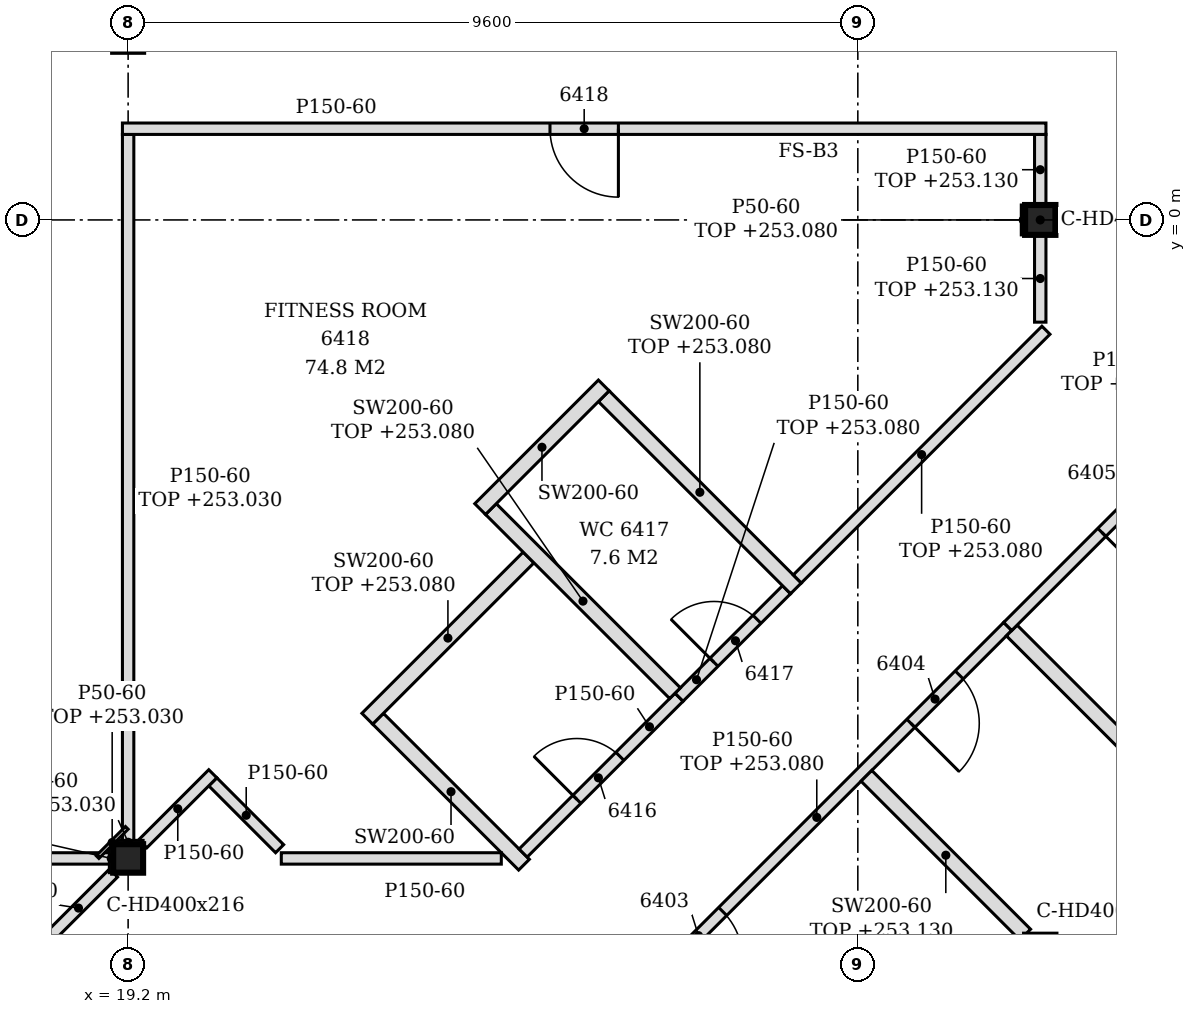
"""IFC4 building model, lengths in metres.
Left out: names, types, materials, properties, quantities, classifications, styles, units other than length and angle.
Written with IfcOpenShell. Run it as: python <this file> out.ifc"""

import sys

from ifc_helpers import new_model, si_unit, direction, frame, frame_2d, origin, origin_2d, place, context, subcontext, project, spatial, polyline, rectangle, i_section, outline, extrude, element, fill, save


model = new_model("IFC4")
c1 = context("Model", 3, precision=1e-05, world=origin(), true_north=direction((0.0, 1.0)))
c2 = subcontext(c1, "Body", "Model", "MODEL_VIEW")
j1 = project(units=[si_unit("LENGTHUNIT", "METRE"), si_unit("PLANEANGLEUNIT", "RADIAN")], contexts=[c1])
p1 = place(None, origin())
s1 = spatial("IfcSite", under=j1, at=p1, CompositionType="ELEMENT")
p2 = place(p1, origin())
s2 = spatial("IfcBuilding", under=s1, at=p2, CompositionType="ELEMENT")
p3 = place(p2, frame((0.0, 0.0, 250.2)))
s3 = spatial("IfcBuildingStorey", under=s2, at=p3, CompositionType="ELEMENT", Elevation=250.2)
p4 = place(p3, frame((19.2, -8.4, -0.15), z_axis=(0.0, 0.0, 1.0), x_axis=(1.0, 0.0, 0.0)))
e1 = element("IfcColumn", 1, at=p4, inside=s3, PredefinedType="COLUMN", context=c2, shape_type="SweptSolid", body=[
    extrude(i_section(OverallWidth=0.394, OverallDepth=0.375, WebThickness=0.017, FlangeThickness=0.028, FilletRadius=0.015, at=origin_2d()), origin(), (0.0, 0.0, 1.0), 3.6),
])
p5 = place(p3, frame((31.2, 0.0, -0.15), z_axis=(0.0, 0.0, 1.0), x_axis=(1.0, 0.0, 0.0)))
e2 = element("IfcColumn", 2, at=p5, inside=s3, PredefinedType="COLUMN", context=c2, shape_type="SweptSolid", body=[
    extrude(i_section(OverallWidth=0.399, OverallDepth=0.393, WebThickness=0.023, FlangeThickness=0.037, FilletRadius=0.015, at=origin_2d()), origin(), (0.0, 0.0, 1.0), 3.6),
])
p6 = place(p3, frame((24.619, -11.501, 0.0), z_axis=(0.0, 0.0, 1.0), x_axis=(0.707106781187, 0.707106781187, 0.0)))
e3 = element("IfcWall", 3, at=p6, inside=s3, PredefinedType="PARTITIONING", context=c2, shape_type="SweptSolid", body=[
    extrude(rectangle(XDim=8.702, YDim=0.15, at=frame_2d((4.351, 0.0))), origin(), (0.0, 0.0, 1.0), 2.88),
])
p7 = place(p6, frame((2.499, 0.0, 0.0)))
e4 = element("IfcOpeningElement", 4, at=p7, cuts=e3, PredefinedType="OPENING", context=c2, shape_type="SweptSolid", body=[
    extrude(rectangle(XDim=0.9, YDim=2.1, at=frame_2d((0.45, 1.05))), frame((0.0, 0.085, 0.0), z_axis=(0.0, -1.0, 0.0), x_axis=(1.0, 0.0, 0.0)), (0.0, 0.0, 1.0), 0.17),
])
p8 = place(p6, frame((6.9, 0.0, 0.0)))
e5 = element("IfcOpeningElement", 5, at=p8, cuts=e3, PredefinedType="OPENING", context=c2, shape_type="SweptSolid", body=[
    extrude(rectangle(XDim=0.9, YDim=2.1, at=frame_2d((0.45, 1.05))), frame((0.0, 0.085, 0.0), z_axis=(0.0, -1.0, 0.0), x_axis=(1.0, 0.0, 0.0)), (0.0, 0.0, 1.0), 0.17),
])
p9 = place(p3, frame((35.873, -10.449, 0.0), z_axis=(0.0, 0.0, 1.0), x_axis=(-0.707089680867, 0.707123881093, 0.0)))
e6 = element("IfcWall", 6, at=p9, inside=s3, PredefinedType="PARTITIONING", context=c2, shape_type="SweptSolid", body=[
    extrude(rectangle(XDim=7.139, YDim=0.2, at=frame_2d((3.569, 0.0))), origin(), (0.0, 0.0, 1.0), 2.93),
])
p10 = place(p3, frame((18.086, -9.514, 0.0), z_axis=(0.0, 0.0, 1.0), x_axis=(0.707200419109, 0.707013130862, 0.0)))
e7 = element("IfcWall", 7, at=p10, inside=s3, PredefinedType="PARTITIONING", context=c2, shape_type="SweptSolid", body=[
    extrude(rectangle(XDim=1.303, YDim=0.15, at=frame_2d((0.652, 0.0))), origin(), (0.0, 0.0, 1.0), 3.45),
])
p11 = place(p3, frame((31.002, -9.402, 0.0), z_axis=(0.0, 0.0, 1.0), x_axis=(-0.707065460118, 0.70714809984, 0.0)))
e8 = element("IfcWall", 8, at=p11, inside=s3, PredefinedType="PARTITIONING", context=c2, shape_type="SweptSolid", body=[
    extrude(rectangle(XDim=2.954, YDim=0.2, at=frame_2d((1.477, 0.0))), origin(), (0.0, 0.0, 1.0), 2.93),
])
p12 = place(p3, frame((24.408, -8.482, 0.0), z_axis=(0.0, 0.0, 1.0), x_axis=(-0.707061835578, 0.707151723938, 0.0)))
e9 = element("IfcWall", 9, at=p12, inside=s3, PredefinedType="PARTITIONING", context=c2, shape_type="SweptSolid", body=[
    extrude(rectangle(XDim=2.716, YDim=0.2, at=frame_2d((1.358, 0.0))), origin(), (0.0, 0.0, 1.0), 3.45),
])
p13 = place(p3, frame((7.397, -8.4, 0.0), z_axis=(0.0, 0.0, 1.0), x_axis=(1.0, 0.0, 0.0)))
e10 = element("IfcWall", 10, at=p13, inside=s3, PredefinedType="PARTITIONING", context=c2, shape_type="SweptSolid", body=[
    extrude(rectangle(XDim=11.606, YDim=0.15, at=frame_2d((5.803, 0.0))), origin(), (0.0, 0.0, 1.0), 2.83),
])
p14 = place(p3, frame((21.215, -8.4, 0.0), z_axis=(0.0, 0.0, 1.0), x_axis=(1.0, 0.0, 0.0)))
e11 = element("IfcWall", 11, at=p14, inside=s3, PredefinedType="PARTITIONING", context=c2, shape_type="SweptSolid", body=[
    extrude(rectangle(XDim=2.895, YDim=0.15, at=frame_2d((1.447, 0.0))), origin(), (0.0, 0.0, 1.0), 3.45),
])
p15 = place(p3, frame((21.193, -8.272, 0.0), z_axis=(0.0, 0.0, 1.0), x_axis=(-0.706812296552, 0.70740114323, 0.0)))
e12 = element("IfcWall", 12, at=p15, inside=s3, PredefinedType="PARTITIONING", context=c2, shape_type="SweptSolid", body=[
    extrude(rectangle(XDim=1.244, YDim=0.15, at=frame_2d((0.622, 0.0))), origin(), (0.0, 0.0, 1.0), 3.45),
])
p16 = place(p3, frame((24.397, -8.329, 0.0), z_axis=(0.0, 0.0, 1.0), x_axis=(0.707275119896, 0.706938402391, 0.0)))
e13 = element("IfcWall", 13, at=p16, inside=s3, PredefinedType="PARTITIONING", context=c2, shape_type="SweptSolid", body=[
    extrude(rectangle(XDim=2.9, YDim=0.15, at=frame_2d((1.45, 0.0))), origin(), (0.0, 0.0, 1.0), 3.45),
])
p17 = place(p16, frame((1.0, 0.0, 0.0)))
e14 = element("IfcOpeningElement", 14, at=p17, cuts=e13, PredefinedType="OPENING", context=c2, shape_type="SweptSolid", body=[
    extrude(rectangle(XDim=0.8, YDim=2.1, at=frame_2d((0.4, 1.05))), frame((0.0, 0.085, 0.0), z_axis=(0.0, -1.0, 0.0), x_axis=(1.0, 0.0, 0.0)), (0.0, 0.0, 1.0), 0.17),
])
p18 = place(p3, frame((19.2, -8.212, 0.0), z_axis=(0.0, 0.0, 1.0), x_axis=(0.0, 1.0, 0.0)))
e15 = element("IfcWall", 15, at=p18, inside=s3, PredefinedType="PARTITIONING", context=c2, shape_type="SweptSolid", body=[
    extrude(rectangle(XDim=9.337, YDim=0.15, at=frame_2d((4.669, 0.0))), origin(), (0.0, 0.0, 1.0), 2.83),
])
p19 = place(p3, frame((19.392, -8.208, 0.0), z_axis=(0.0, 0.0, 1.0), x_axis=(0.707106781187, 0.707106781187, 0.0)))
e16 = element("IfcWall", 16, at=p19, inside=s3, PredefinedType="PARTITIONING", context=c2, shape_type="SweptSolid", body=[
    extrude(rectangle(XDim=1.304, YDim=0.15, at=frame_2d((0.652, 0.0))), origin(), (0.0, 0.0, 1.0), 3.45),
])
p20 = place(p3, frame((22.346, -6.562, 0.0), z_axis=(0.0, 0.0, 1.0), x_axis=(0.707269502796, 0.706944022123, 0.0)))
e17 = element("IfcWall", 17, at=p20, inside=s3, PredefinedType="PARTITIONING", context=c2, shape_type="SweptSolid", body=[
    extrude(rectangle(XDim=3.0, YDim=0.2, at=frame_2d((1.5, 0.0))), origin(), (0.0, 0.0, 1.0), 2.88),
])
p21 = place(p3, frame((26.448, -6.279, 0.0), z_axis=(0.0, 0.0, 1.0), x_axis=(0.707106781187, 0.707106781187, 0.0)))
e18 = element("IfcWall", 18, at=p21, inside=s3, PredefinedType="PARTITIONING", context=c2, shape_type="SweptSolid", body=[
    extrude(rectangle(XDim=2.0, YDim=0.15, at=frame_2d((1.0, 0.0))), origin(), (0.0, 0.0, 1.0), 2.88),
])
p22 = place(p21, frame((0.65, 0.0, 0.0)))
e19 = element("IfcOpeningElement", 19, at=p22, cuts=e18, PredefinedType="OPENING", context=c2, shape_type="SweptSolid", body=[
    extrude(rectangle(XDim=0.8, YDim=2.1, at=frame_2d((0.4, 1.05))), frame((0.0, 0.085, 0.0), z_axis=(0.0, -1.0, 0.0), x_axis=(1.0, 0.0, 0.0)), (0.0, 0.0, 1.0), 0.17),
])
p23 = place(p3, frame((26.395, -6.226, 0.0), z_axis=(0.0, 0.0, 1.0), x_axis=(-0.707106781187, 0.707106781187, 0.0)))
e20 = element("IfcWall", 20, at=p23, inside=s3, PredefinedType="PARTITIONING", context=c2, shape_type="SweptSolid", body=[
    extrude(rectangle(XDim=3.426, YDim=0.2, at=frame_2d((1.713, 0.0))), origin(), (0.0, 0.0, 1.0), 2.88),
])
p24 = place(p3, frame((30.772, -5.348, 0.0), z_axis=(0.0, 0.0, 1.0), x_axis=(0.70724543229, 0.706968102891, 0.0)))
e21 = element("IfcWall", 21, at=p24, inside=s3, PredefinedType="PARTITIONING", context=c2, shape_type="SweptSolid", body=[
    extrude(rectangle(XDim=4.402, YDim=0.15, at=frame_2d((2.201, 0.0))), origin(), (0.0, 0.0, 1.0), 2.93),
])
p25 = place(p24, frame((1.751, 0.0, 0.0)))
e22 = element("IfcOpeningElement", 22, at=p25, cuts=e21, PredefinedType="OPENING", context=c2, shape_type="SweptSolid", body=[
    extrude(rectangle(XDim=0.9, YDim=2.1, at=frame_2d((0.45, 1.05))), frame((0.0, 0.085, 0.0), z_axis=(0.0, -1.0, 0.0), x_axis=(1.0, 0.0, 0.0)), (0.0, 0.0, 1.0), 0.17),
])
p26 = place(p3, frame((27.986, -4.847, 0.0), z_axis=(0.0, 0.0, 1.0), x_axis=(-0.707106781187, 0.707106781187, 0.0)))
e23 = element("IfcWall", 23, at=p26, inside=s3, PredefinedType="PARTITIONING", context=c2, shape_type="SweptSolid", body=[
    extrude(rectangle(XDim=3.576, YDim=0.2, at=frame_2d((1.788, 0.0))), origin(), (0.0, 0.0, 1.0), 2.88),
])
p27 = place(p3, frame((28.004, -4.723, 0.0), z_axis=(0.0, 0.0, 1.0), x_axis=(0.706974860744, 0.707238677022, 0.0)))
e24 = element("IfcWall", 24, at=p27, inside=s3, PredefinedType="PARTITIONING", context=c2, shape_type="SweptSolid", body=[
    extrude(rectangle(XDim=4.627, YDim=0.15, at=frame_2d((2.313, 0.0))), origin(), (0.0, 0.0, 1.0), 2.88),
])
p28 = place(p3, frame((23.831, -3.804, 0.0), z_axis=(0.0, 0.0, 1.0), x_axis=(0.707106781187, 0.707106781187, 0.0)))
e25 = element("IfcWall", 25, at=p28, inside=s3, PredefinedType="PARTITIONING", context=c2, shape_type="SweptSolid", body=[
    extrude(rectangle(XDim=2.3, YDim=0.2, at=frame_2d((1.15, 0.0))), origin(), (0.0, 0.0, 1.0), 3.45),
])
p29 = place(p3, frame((31.2, -1.345, 0.0), z_axis=(0.0, 0.0, 1.0), x_axis=(0.0, 1.0, 0.0)))
e26 = element("IfcWall", 26, at=p29, inside=s3, PredefinedType="PARTITIONING", context=c2, shape_type="SweptSolid", body=[
    extrude(rectangle(XDim=1.148, YDim=0.15, at=frame_2d((0.574, 0.0))), origin(), (0.0, 0.0, 1.0), 2.93),
])
p30 = place(p3, frame((31.2, 0.197, 0.0), z_axis=(0.0, 0.0, 1.0), x_axis=(0.0, 1.0, 0.0)))
e27 = element("IfcWall", 27, at=p30, inside=s3, PredefinedType="PARTITIONING", context=c2, shape_type="SweptSolid", body=[
    extrude(rectangle(XDim=0.928, YDim=0.15, at=frame_2d((0.464, 0.0))), origin(), (0.0, 0.0, 1.0), 2.93),
])
p31 = place(p3, frame((34.8, 0.994, 0.0), z_axis=(0.0, 0.0, 1.0), x_axis=(-0.707099634543, 0.707113927758, 0.0)))
e28 = element("IfcWall", 28, at=p31, inside=s3, PredefinedType="PARTITIONING", context=c2, shape_type="SweptSolid", body=[
    extrude(rectangle(XDim=17.081, YDim=0.15, at=frame_2d((8.541, 0.0))), origin(), (0.0, 0.0, 1.0), 2.88),
])
p32 = place(p31, frame((3.276, 0.0, 0.0)))
e29 = element("IfcOpeningElement", 29, at=p32, cuts=e28, PredefinedType="OPENING", context=c2, shape_type="SweptSolid", body=[
    extrude(rectangle(XDim=0.9, YDim=2.1, at=frame_2d((0.45, 1.05))), frame((0.0, 0.085, 0.0), z_axis=(0.0, -1.0, 0.0), x_axis=(1.0, 0.0, 0.0)), (0.0, 0.0, 1.0), 0.17),
])
p33 = place(p31, frame((6.829, 0.0, 0.0)))
e30 = element("IfcOpeningElement", 30, at=p33, cuts=e28, PredefinedType="OPENING", context=c2, shape_type="SweptSolid", body=[
    extrude(rectangle(XDim=0.9, YDim=2.1, at=frame_2d((0.45, 1.05))), frame((0.0, 0.085, 0.0), z_axis=(0.0, -1.0, 0.0), x_axis=(1.0, 0.0, 0.0)), (0.0, 0.0, 1.0), 0.17),
])
p34 = place(p31, frame((11.23, 0.0, 0.0)))
e31 = element("IfcOpeningElement", 31, at=p34, cuts=e28, PredefinedType="OPENING", context=c2, shape_type="SweptSolid", body=[
    extrude(rectangle(XDim=0.9, YDim=2.1, at=frame_2d((0.45, 1.05))), frame((0.0, 0.085, 0.0), z_axis=(0.0, -1.0, 0.0), x_axis=(1.0, 0.0, 0.0)), (0.0, 0.0, 1.0), 0.17),
])
p35 = place(p3, frame((19.125, 1.2, 0.0), z_axis=(0.0, 0.0, 1.0), x_axis=(1.0, 0.0, 0.0)))
e32 = element("IfcWall", 32, at=p35, inside=s3, PredefinedType="PARTITIONING", context=c2, shape_type="SweptSolid", body=[
    extrude(outline(polyline([(0.0, 0.0), (12.15, 0.0), (12.15, 2.93), (11.925, 2.93), (11.923, 3.45), (0.225, 3.45), (0.223, 2.83), (0.0, 2.83), (0.0, 0.0)])), frame((0.0, 0.075, 0.0), z_axis=(0.0, -1.0, 0.0), x_axis=(1.0, 0.0, 0.0)), (0.0, 0.0, 1.0), 0.15),
])
p36 = place(p35, frame((5.625, 0.0, 0.0)))
e33 = element("IfcOpeningElement", 33, at=p36, cuts=e32, PredefinedType="OPENING", context=c2, shape_type="SweptSolid", body=[
    extrude(rectangle(XDim=0.9, YDim=2.1, at=frame_2d((0.45, 1.05))), frame((0.0, 0.085, 0.0), z_axis=(0.0, -1.0, 0.0), x_axis=(1.0, 0.0, 0.0)), (0.0, 0.0, 1.0), 0.17),
])
p37 = place(p3, frame((18.798, -8.382, 0.0), z_axis=(0.0, 0.0, 1.0), x_axis=(0.707106781187, 0.707106781187, 0.0)))
e34 = element("IfcWall", 34, at=p37, inside=s3, PredefinedType="PARTITIONING", context=c2, shape_type="SweptSolid", body=[
    extrude(rectangle(XDim=0.544, YDim=0.05, at=frame_2d((0.272, 0.0))), origin(), (0.0, 0.0, 1.0), 2.83),
])
p38 = place(p3, frame((19.003, -8.188, 0.0), z_axis=(0.0, 0.0, 1.0), x_axis=(1.0, 0.0, 0.0)))
e35 = element("IfcWall", 35, at=p38, inside=s3, PredefinedType="PARTITIONING", context=c2, shape_type="SweptSolid", body=[
    extrude(rectangle(XDim=0.394, YDim=0.05, at=frame_2d((0.197, 0.0))), origin(), (0.0, 0.0, 1.0), 2.83),
])
p39 = place(p3, frame((18.978, -8.587, 0.0), z_axis=(0.0, 0.0, 1.0), x_axis=(0.0, 1.0, 0.0)))
e36 = element("IfcWall", 36, at=p39, inside=s3, PredefinedType="PARTITIONING", context=c2, shape_type="SweptSolid", body=[
    extrude(rectangle(XDim=0.375, YDim=0.05, at=frame_2d((0.188, 0.0))), origin(), (0.0, 0.0, 1.0), 2.83),
])
p40 = place(p3, frame((30.976, -0.197, 0.0), z_axis=(0.0, 0.0, 1.0), x_axis=(0.0, 1.0, 0.0)))
e37 = element("IfcWall", 37, at=p40, inside=s3, PredefinedType="PARTITIONING", context=c2, shape_type="SweptSolid", body=[
    extrude(rectangle(XDim=0.393, YDim=0.05, at=frame_2d((0.197, 0.0))), origin(), (0.0, 0.0, 1.0), 2.88),
])
p41 = place(p7, frame((0.9, 0.0, 0.0), z_axis=(0.0, 0.0, 1.0), x_axis=(-1.0, 0.0, 0.0)))
e38 = element("IfcDoor", 38, at=p41, inside=s3, OperationType="SINGLE_SWING_RIGHT", PredefinedType="DOOR", context=c2, shape_type="SweptSolid", body=[
    extrude(rectangle(XDim=0.9, YDim=2.1, at=frame_2d((0.45, 1.05))), frame((0.0, 0.025, 0.0), z_axis=(0.0, -1.0, 0.0), x_axis=(1.0, 0.0, 0.0)), (0.0, 0.0, 1.0), 0.05),
])
fill(e4, e38)
p42 = place(p8, frame((0.9, 0.0, 0.0), z_axis=(0.0, 0.0, 1.0), x_axis=(-1.0, 0.0, 0.0)))
e39 = element("IfcDoor", 39, at=p42, inside=s3, OperationType="SINGLE_SWING_RIGHT", PredefinedType="DOOR", context=c2, shape_type="SweptSolid", body=[
    extrude(rectangle(XDim=0.9, YDim=2.1, at=frame_2d((0.45, 1.05))), frame((0.0, 0.025, 0.0), z_axis=(0.0, -1.0, 0.0), x_axis=(1.0, 0.0, 0.0)), (0.0, 0.0, 1.0), 0.05),
])
fill(e5, e39)
p43 = place(p25, frame((0.9, 0.0, 0.0), z_axis=(0.0, 0.0, 1.0), x_axis=(-1.0, 0.0, 0.0)))
e40 = element("IfcDoor", 40, at=p43, inside=s3, OperationType="SINGLE_SWING_RIGHT", PredefinedType="DOOR", context=c2, shape_type="SweptSolid", body=[
    extrude(rectangle(XDim=0.9, YDim=2.1, at=frame_2d((0.45, 1.05))), frame((0.0, 0.025, 0.0), z_axis=(0.0, -1.0, 0.0), x_axis=(1.0, 0.0, 0.0)), (0.0, 0.0, 1.0), 0.05),
])
fill(e22, e40)
p44 = place(p17, origin())
e41 = element("IfcDoor", 41, at=p44, inside=s3, OperationType="SINGLE_SWING_LEFT", PredefinedType="DOOR", context=c2, shape_type="SweptSolid", body=[
    extrude(rectangle(XDim=0.8, YDim=2.1, at=frame_2d((0.4, 1.05))), frame((0.0, 0.025, 0.0), z_axis=(0.0, -1.0, 0.0), x_axis=(1.0, 0.0, 0.0)), (0.0, 0.0, 1.0), 0.05),
])
fill(e14, e41)
p45 = place(p22, origin())
e42 = element("IfcDoor", 42, at=p45, inside=s3, OperationType="SINGLE_SWING_LEFT", PredefinedType="DOOR", context=c2, shape_type="SweptSolid", body=[
    extrude(rectangle(XDim=0.8, YDim=2.1, at=frame_2d((0.4, 1.05))), frame((0.0, 0.025, 0.0), z_axis=(0.0, -1.0, 0.0), x_axis=(1.0, 0.0, 0.0)), (0.0, 0.0, 1.0), 0.05),
])
fill(e19, e42)
p46 = place(p36, frame((0.9, 0.0, 0.0), z_axis=(0.0, 0.0, 1.0), x_axis=(-1.0, 0.0, 0.0)))
e43 = element("IfcDoor", 43, at=p46, inside=s3, OperationType="SINGLE_SWING_LEFT", PredefinedType="DOOR", context=c2, shape_type="SweptSolid", body=[
    extrude(rectangle(XDim=0.9, YDim=2.1, at=frame_2d((0.45, 1.05))), frame((0.0, 0.025, 0.0), z_axis=(0.0, -1.0, 0.0), x_axis=(1.0, 0.0, 0.0)), (0.0, 0.0, 1.0), 0.05),
])
fill(e33, e43)
save(model, sys.argv[1])
